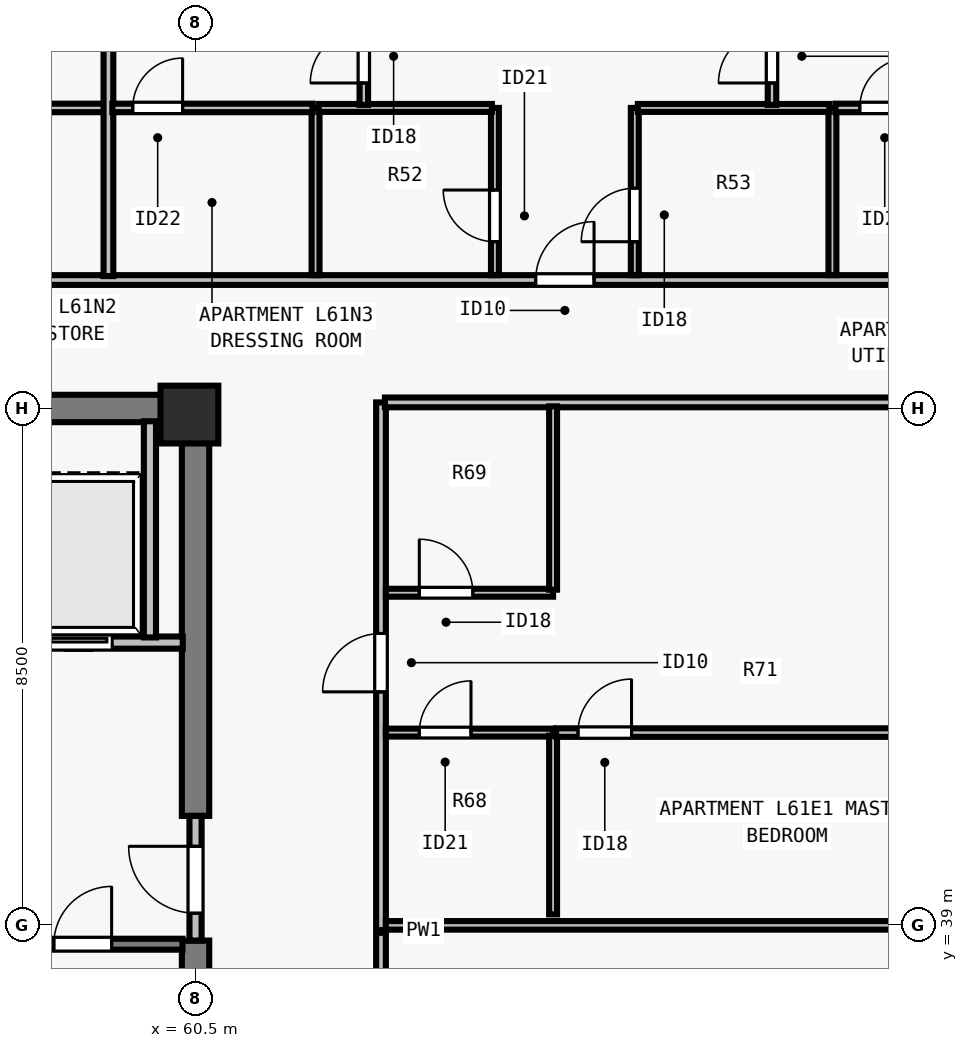
"""IFC4 building model, lengths in metres.
Left out: names, types, materials, properties, quantities, classifications, styles, units other than length and angle.
Written with IfcOpenShell. Run it as: python <this file> out.ifc"""

import sys

from ifc_helpers import new_model, si_unit, direction, frame, frame_2d, origin, origin_2d, place, context, subcontext, project, spatial, rectangle, extrude, element, fill, save


model = new_model("IFC4")
c1 = context("Model", 3, precision=1e-05, world=origin(), true_north=direction((0.0, 1.0)))
c2 = subcontext(c1, "Body", "Model", "MODEL_VIEW")
j1 = project(units=[si_unit("LENGTHUNIT", "METRE"), si_unit("PLANEANGLEUNIT", "RADIAN")], contexts=[c1])
p1 = place(None, origin())
s1 = spatial("IfcSite", under=j1, at=p1, CompositionType="ELEMENT")
p2 = place(p1, origin())
s2 = spatial("IfcBuilding", under=s1, at=p2, CompositionType="ELEMENT")
p3 = place(p2, frame((0.0, 0.0, 223.5)))
s3 = spatial("IfcBuildingStorey", under=s2, at=p3, CompositionType="ELEMENT", Elevation=223.5)
p4 = place(p3, frame((60.4, 47.4, 0.0), z_axis=(0.0, 0.0, 1.0), x_axis=(1.0, 0.0, 0.0)))
e1 = element("IfcColumn", 1, at=p4, inside=s3, PredefinedType="COLUMN", context=c2, shape_type="SweptSolid", body=[
    extrude(rectangle(XDim=0.95, YDim=0.95, at=origin_2d()), origin(), (0.0, 0.0, 1.0), 3.5),
])
p5 = place(p3, frame((43.275, 47.5, 0.0), z_axis=(0.0, 0.0, 1.0), x_axis=(1.0, 0.0, 0.0)))
e2 = element("IfcWall", 2, at=p5, inside=s3, PredefinedType="SHEAR", context=c2, shape_type="SweptSolid", body=[
    extrude(rectangle(XDim=17.45, YDim=0.45, at=frame_2d((8.725, 0.0))), origin(), (0.0, 0.0, 1.0), 3.29),
])
p6 = place(p3, frame((60.5, 30.715, 0.0), z_axis=(0.0, 0.0, 1.0), x_axis=(0.0, 1.0, 0.0)))
e3 = element("IfcWall", 3, at=p6, inside=s3, PredefinedType="SHEAR", context=c2, shape_type="SweptSolid", body=[
    extrude(rectangle(XDim=8.035, YDim=0.45, at=frame_2d((4.018, 0.0))), origin(), (0.0, 0.0, 1.0), 3.29),
])
p7 = place(p3, frame((60.5, 40.8, 0.0), z_axis=(0.0, 0.0, 1.0), x_axis=(0.0, 1.0, 0.0)))
e4 = element("IfcWall", 4, at=p7, inside=s3, PredefinedType="SHEAR", context=c2, shape_type="SweptSolid", body=[
    extrude(rectangle(XDim=6.485, YDim=0.45, at=frame_2d((3.242, 0.0))), origin(), (0.0, 0.0, 1.0), 3.29),
])
p8 = place(p3, frame((60.5, 38.75, 0.0), z_axis=(0.0, 0.0, 1.0), x_axis=(0.0, 1.0, 0.0)))
e5 = element("IfcWall", 5, at=p8, inside=s3, PredefinedType="SOLIDWALL", context=c2, shape_type="SweptSolid", body=[
    extrude(rectangle(XDim=2.05, YDim=0.2, at=frame_2d((1.025, 0.0))), origin(), (0.0, 0.0, 1.0), 3.29),
])
p9 = place(p8, frame((0.45, 0.0, 0.0)))
e6 = element("IfcOpeningElement", 6, at=p9, cuts=e5, PredefinedType="OPENING", context=c2, shape_type="SweptSolid", body=[
    extrude(rectangle(XDim=1.1, YDim=2.15, at=frame_2d((0.55, 1.075))), frame((0.0, 0.11, 0.0), z_axis=(0.0, -1.0, 0.0), x_axis=(1.0, 0.0, 0.0)), (0.0, 0.0, 1.0), 0.22),
])
p10 = place(p3, frame((56.735, 43.65, 0.0), z_axis=(0.0, 0.0, 1.0), x_axis=(1.0, 0.0, 0.0)))
e7 = element("IfcWall", 7, at=p10, inside=s3, PredefinedType="SOLIDWALL", context=c2, shape_type="SweptSolid", body=[
    extrude(rectangle(XDim=3.555, YDim=0.2, at=frame_2d((1.777, 0.0))), origin(), (0.0, 0.0, 1.0), 3.29),
])
p11 = place(p10, frame((1.295, 0.0, 0.0)))
e8 = element("IfcOpeningElement", 8, at=p11, cuts=e7, PredefinedType="OPENING", context=c2, shape_type="SweptSolid", body=[
    extrude(rectangle(XDim=1.1, YDim=2.2, at=frame_2d((0.55, 1.1))), frame((0.0, 0.11, 0.0), z_axis=(0.0, -1.0, 0.0), x_axis=(1.0, 0.0, 0.0)), (0.0, 0.0, 1.0), 0.22),
])
p12 = place(p3, frame((59.75, 43.735, 0.0), z_axis=(0.0, 0.0, 1.0), x_axis=(0.0, 1.0, 0.0)))
e9 = element("IfcWall", 9, at=p12, inside=s3, PredefinedType="SOLIDWALL", context=c2, shape_type="SweptSolid", body=[
    extrude(rectangle(XDim=3.555, YDim=0.2, at=frame_2d((1.777, 0.0))), origin(), (0.0, 0.0, 1.0), 3.29),
])
p13 = place(p3, frame((29.805, 49.613, 0.0), z_axis=(0.0, 0.0, 1.0), x_axis=(1.0, 0.0, 0.0)))
e10 = element("IfcWall", 10, at=p13, inside=s3, PredefinedType="PARTITIONING", context=c2, shape_type="SweptSolid", body=[
    extrude(rectangle(XDim=44.39, YDim=0.16, at=frame_2d((22.195, 0.0))), origin(), (0.0, 0.0, 1.0), 2.958),
])
p14 = place(p13, frame((7.206, 0.0, 0.0)))
e11 = element("IfcOpeningElement", 11, at=p14, cuts=e10, PredefinedType="OPENING", context=c2, shape_type="SweptSolid", body=[
    extrude(rectangle(XDim=0.96, YDim=2.18, at=frame_2d((0.48, 1.09))), frame((0.0, 0.09, 0.0), z_axis=(0.0, -1.0, 0.0), x_axis=(1.0, 0.0, 0.0)), (0.0, 0.0, 1.0), 0.18),
])
p15 = place(p13, frame((21.78, 0.0, 0.0)))
e12 = element("IfcOpeningElement", 12, at=p15, cuts=e10, PredefinedType="OPENING", context=c2, shape_type="SweptSolid", body=[
    extrude(rectangle(XDim=0.96, YDim=2.18, at=frame_2d((0.48, 1.09))), frame((0.0, 0.09, 0.0), z_axis=(0.0, -1.0, 0.0), x_axis=(1.0, 0.0, 0.0)), (0.0, 0.0, 1.0), 0.18),
])
p16 = place(p13, frame((36.289, 0.0, 0.0)))
e13 = element("IfcOpeningElement", 13, at=p16, cuts=e10, PredefinedType="OPENING", context=c2, shape_type="SweptSolid", body=[
    extrude(rectangle(XDim=0.96, YDim=2.18, at=frame_2d((0.48, 1.09))), frame((0.0, 0.09, 0.0), z_axis=(0.0, -1.0, 0.0), x_axis=(1.0, 0.0, 0.0)), (0.0, 0.0, 1.0), 0.18),
])
p17 = place(p3, frame((63.55, 30.4, 0.0), z_axis=(0.0, 0.0, 1.0), x_axis=(0.0, 1.0, 0.0)))
e14 = element("IfcWall", 14, at=p17, inside=s3, PredefinedType="PARTITIONING", context=c2, shape_type="SweptSolid", body=[
    extrude(rectangle(XDim=17.2, YDim=0.16, at=frame_2d((8.6, 0.0))), origin(), (0.0, 0.0, 1.0), 3.29),
])
p18 = place(p17, frame((3.6, 0.0, 0.0)))
e15 = element("IfcOpeningElement", 15, at=p18, cuts=e14, PredefinedType="OPENING", context=c2, shape_type="SweptSolid", body=[
    extrude(rectangle(XDim=0.96, YDim=2.12, at=frame_2d((0.48, 1.06))), frame((0.0, 0.09, 0.0), z_axis=(0.0, -1.0, 0.0), x_axis=(1.0, 0.0, 0.0)), (0.0, 0.0, 1.0), 0.18),
])
p19 = place(p17, frame((12.44, 0.0, 0.0)))
e16 = element("IfcOpeningElement", 16, at=p19, cuts=e14, PredefinedType="OPENING", context=c2, shape_type="SweptSolid", body=[
    extrude(rectangle(XDim=0.96, YDim=2.18, at=frame_2d((0.48, 1.09))), frame((0.0, 0.09, 0.0), z_axis=(0.0, -1.0, 0.0), x_axis=(1.0, 0.0, 0.0)), (0.0, 0.0, 1.0), 0.18),
])
p20 = place(p3, frame((63.615, 47.6, 0.0), z_axis=(0.0, 0.0, 1.0), x_axis=(1.0, 0.0, 0.0)))
e17 = element("IfcWall", 17, at=p20, inside=s3, PredefinedType="PARTITIONING", context=c2, shape_type="SweptSolid", body=[
    extrude(rectangle(XDim=10.58, YDim=0.16, at=frame_2d((5.29, 0.0))), origin(), (0.0, 0.0, 1.0), 3.29),
])
p21 = place(p3, frame((56.515, 52.442, 0.0), z_axis=(0.0, 0.0, 1.0), x_axis=(1.0, 0.0, 0.0)))
e18 = element("IfcWall", 18, at=p21, inside=s3, PredefinedType="PARTITIONING", context=c2, shape_type="SweptSolid", body=[
    extrude(rectangle(XDim=2.603, YDim=0.14, at=frame_2d((1.301, 0.0))), origin(), (0.0, 0.0, 1.0), 3.29),
])
p22 = place(p21, frame((0.4, 0.0, 0.0)))
e19 = element("IfcOpeningElement", 19, at=p22, cuts=e18, PredefinedType="OPENING", context=c2, shape_type="SweptSolid", body=[
    extrude(rectangle(XDim=0.82, YDim=2.1, at=frame_2d((0.41, 1.05))), frame((0.0, 0.08, 0.0), z_axis=(0.0, -1.0, 0.0), x_axis=(1.0, 0.0, 0.0)), (0.0, 0.0, 1.0), 0.16),
])
p23 = place(p3, frame((59.067, 49.677, 0.0), z_axis=(0.0, 0.0, 1.0), x_axis=(0.0, 1.0, 0.0)))
e20 = element("IfcWall", 20, at=p23, inside=s3, PredefinedType="PARTITIONING", context=c2, shape_type="SweptSolid", body=[
    extrude(rectangle(XDim=11.518, YDim=0.16, at=frame_2d((5.759, 0.0))), origin(), (0.0, 0.0, 1.0), 3.29),
])
p24 = place(p3, frame((62.474, 49.692, 0.0), z_axis=(0.0, 0.0, 1.0), x_axis=(0.0, 1.0, 0.0)))
e21 = element("IfcWall", 21, at=p24, inside=s3, PredefinedType="PLUMBINGWALL", context=c2, shape_type="SweptSolid", body=[
    extrude(rectangle(XDim=2.75, YDim=0.13, at=frame_2d((1.375, 0.0))), origin(), (0.0, 0.0, 1.0), 2.573),
])
p25 = place(p3, frame((65.424, 49.692, 0.0), z_axis=(0.0, 0.0, 1.0), x_axis=(0.0, 1.0, 0.0)))
e22 = element("IfcWall", 22, at=p25, inside=s3, PredefinedType="PLUMBINGWALL", context=c2, shape_type="SweptSolid", body=[
    extrude(rectangle(XDim=2.75, YDim=0.13, at=frame_2d((1.375, 0.0))), origin(), (0.0, 0.0, 1.0), 3.29),
])
p26 = place(p25, frame((0.55, 0.0, 0.0)))
e23 = element("IfcOpeningElement", 23, at=p26, cuts=e22, PredefinedType="OPENING", context=c2, shape_type="SweptSolid", body=[
    extrude(rectangle(XDim=0.85, YDim=2.08, at=frame_2d((0.425, 1.04))), frame((0.0, 0.075, 0.0), z_axis=(0.0, -1.0, 0.0), x_axis=(1.0, 0.0, 0.0)), (0.0, 0.0, 1.0), 0.15),
])
p27 = place(p3, frame((62.524, 52.442, 0.0), z_axis=(0.0, 0.0, 1.0), x_axis=(1.0, 0.0, 0.0)))
e24 = element("IfcWall", 24, at=p27, inside=s3, PredefinedType="PLUMBINGWALL", context=c2, shape_type="SweptSolid", body=[
    extrude(rectangle(XDim=2.85, YDim=0.13, at=frame_2d((1.425, 0.0))), origin(), (0.0, 0.0, 1.0), 3.29),
])
p28 = place(p3, frame((70.974, 49.692, 0.0), z_axis=(0.0, 0.0, 1.0), x_axis=(0.0, 1.0, 0.0)))
e25 = element("IfcWall", 25, at=p28, inside=s3, PredefinedType="PLUMBINGWALL", context=c2, shape_type="SweptSolid", body=[
    extrude(rectangle(XDim=2.75, YDim=0.13, at=frame_2d((1.375, 0.0))), origin(), (0.0, 0.0, 1.0), 3.29),
])
p29 = place(p3, frame((67.724, 49.692, 0.0), z_axis=(0.0, 0.0, 1.0), x_axis=(0.0, 1.0, 0.0)))
e26 = element("IfcWall", 26, at=p29, inside=s3, PredefinedType="PLUMBINGWALL", context=c2, shape_type="SweptSolid", body=[
    extrude(rectangle(XDim=2.75, YDim=0.13, at=frame_2d((1.375, 0.0))), origin(), (0.0, 0.0, 1.0), 3.29),
])
p30 = place(p29, frame((0.55, 0.0, 0.0)))
e27 = element("IfcOpeningElement", 27, at=p30, cuts=e26, PredefinedType="OPENING", context=c2, shape_type="SweptSolid", body=[
    extrude(rectangle(XDim=0.88, YDim=2.1, at=frame_2d((0.44, 1.05))), frame((0.0, 0.075, 0.0), z_axis=(0.0, -1.0, 0.0), x_axis=(1.0, 0.0, 0.0)), (0.0, 0.0, 1.0), 0.15),
])
p31 = place(p3, frame((67.774, 52.442, 0.0), z_axis=(0.0, 0.0, 1.0), x_axis=(1.0, 0.0, 0.0)))
e28 = element("IfcWall", 28, at=p31, inside=s3, PredefinedType="PLUMBINGWALL", context=c2, shape_type="SweptSolid", body=[
    extrude(rectangle(XDim=3.15, YDim=0.13, at=frame_2d((1.575, 0.0))), origin(), (0.0, 0.0, 1.0), 2.958),
])
p32 = place(p3, frame((63.268, 52.492, 0.0), z_axis=(0.0, 0.0, 1.0), x_axis=(0.0, 1.0, 0.0)))
e29 = element("IfcWall", 29, at=p32, inside=s3, PredefinedType="PARTITIONING", context=c2, shape_type="SweptSolid", body=[
    extrude(rectangle(XDim=8.628, YDim=0.14, at=frame_2d((4.314, 0.0))), origin(), (0.0, 0.0, 1.0), 3.29),
])
p33 = place(p32, frame((0.36, 0.0, 0.0)))
e30 = element("IfcOpeningElement", 30, at=p33, cuts=e29, PredefinedType="OPENING", context=c2, shape_type="SweptSolid", body=[
    extrude(rectangle(XDim=0.88, YDim=2.1, at=frame_2d((0.44, 1.05))), frame((0.0, 0.08, 0.0), z_axis=(0.0, -1.0, 0.0), x_axis=(1.0, 0.0, 0.0)), (0.0, 0.0, 1.0), 0.16),
])
p34 = place(p3, frame((59.133, 52.442, 0.0), z_axis=(0.0, 0.0, 1.0), x_axis=(1.0, 0.0, 0.0)))
e31 = element("IfcWall", 31, at=p34, inside=s3, PredefinedType="PARTITIONING", context=c2, shape_type="SweptSolid", body=[
    extrude(rectangle(XDim=3.291, YDim=0.14, at=frame_2d((1.646, 0.0))), origin(), (0.0, 0.0, 1.0), 3.29),
])
p35 = place(p34, frame((0.335, 0.0, 0.0)))
e32 = element("IfcOpeningElement", 32, at=p35, cuts=e31, PredefinedType="OPENING", context=c2, shape_type="SweptSolid", body=[
    extrude(rectangle(XDim=0.82, YDim=2.1, at=frame_2d((0.41, 1.05))), frame((0.0, 0.08, 0.0), z_axis=(0.0, -1.0, 0.0), x_axis=(1.0, 0.0, 0.0)), (0.0, 0.0, 1.0), 0.16),
])
p36 = place(p3, frame((69.98, 52.492, 0.0), z_axis=(0.0, 0.0, 1.0), x_axis=(0.0, 1.0, 0.0)))
e33 = element("IfcWall", 33, at=p36, inside=s3, PredefinedType="PARTITIONING", context=c2, shape_type="SweptSolid", body=[
    extrude(rectangle(XDim=3.703, YDim=0.14, at=frame_2d((1.851, 0.0))), origin(), (0.0, 0.0, 1.0), 3.29),
])
p37 = place(p36, frame((0.36, 0.0, 0.0)))
e34 = element("IfcOpeningElement", 34, at=p37, cuts=e33, PredefinedType="OPENING", context=c2, shape_type="SweptSolid", body=[
    extrude(rectangle(XDim=0.88, YDim=2.1, at=frame_2d((0.44, 1.05))), frame((0.0, 0.08, 0.0), z_axis=(0.0, -1.0, 0.0), x_axis=(1.0, 0.0, 0.0)), (0.0, 0.0, 1.0), 0.16),
])
p38 = place(p3, frame((71.024, 52.442, 0.0), z_axis=(0.0, 0.0, 1.0), x_axis=(1.0, 0.0, 0.0)))
e35 = element("IfcWall", 35, at=p38, inside=s3, PredefinedType="PARTITIONING", context=c2, shape_type="SweptSolid", body=[
    extrude(rectangle(XDim=3.106, YDim=0.14, at=frame_2d((1.553, 0.0))), origin(), (0.0, 0.0, 1.0), 3.29),
])
p39 = place(p38, frame((0.4, 0.0, 0.0)))
e36 = element("IfcOpeningElement", 36, at=p39, cuts=e35, PredefinedType="OPENING", context=c2, shape_type="SweptSolid", body=[
    extrude(rectangle(XDim=0.82, YDim=2.1, at=frame_2d((0.41, 1.05))), frame((0.0, 0.08, 0.0), z_axis=(0.0, -1.0, 0.0), x_axis=(1.0, 0.0, 0.0)), (0.0, 0.0, 1.0), 0.16),
])
p40 = place(p3, frame((63.63, 39.0, 0.0), z_axis=(0.0, 0.0, 1.0), x_axis=(1.0, 0.0, 0.0)))
e37 = element("IfcWall", 37, at=p40, inside=s3, PredefinedType="PARTITIONING", context=c2, shape_type="SweptSolid", body=[
    extrude(rectangle(XDim=10.565, YDim=0.14, at=frame_2d((5.283, 0.0))), origin(), (0.0, 0.0, 1.0), 3.29),
])
p41 = place(p3, frame((63.63, 42.17, 0.0), z_axis=(0.0, 0.0, 1.0), x_axis=(1.0, 0.0, 0.0)))
e38 = element("IfcWall", 38, at=p41, inside=s3, PredefinedType="PLUMBINGWALL", context=c2, shape_type="SweptSolid", body=[
    extrude(rectangle(XDim=2.75, YDim=0.13, at=frame_2d((1.375, 0.0))), origin(), (0.0, 0.0, 1.0), 3.29),
])
p42 = place(p41, frame((0.55, 0.0, 0.0)))
e39 = element("IfcOpeningElement", 39, at=p42, cuts=e38, PredefinedType="OPENING", context=c2, shape_type="SweptSolid", body=[
    extrude(rectangle(XDim=0.85, YDim=2.08, at=frame_2d((0.425, 1.04))), frame((0.0, 0.075, 0.0), z_axis=(0.0, -1.0, 0.0), x_axis=(1.0, 0.0, 0.0)), (0.0, 0.0, 1.0), 0.15),
])
p43 = place(p3, frame((66.38, 39.18, 0.0), z_axis=(0.0, 0.0, 1.0), x_axis=(0.0, 1.0, 0.0)))
e40 = element("IfcWall", 40, at=p43, inside=s3, PredefinedType="PLUMBINGWALL", context=c2, shape_type="SweptSolid", body=[
    extrude(rectangle(XDim=2.94, YDim=0.13, at=frame_2d((1.47, 0.0))), origin(), (0.0, 0.0, 1.0), 3.29),
])
p44 = place(p3, frame((63.63, 44.47, 0.0), z_axis=(0.0, 0.0, 1.0), x_axis=(1.0, 0.0, 0.0)))
e41 = element("IfcWall", 41, at=p44, inside=s3, PredefinedType="PLUMBINGWALL", context=c2, shape_type="SweptSolid", body=[
    extrude(rectangle(XDim=2.75, YDim=0.13, at=frame_2d((1.375, 0.0))), origin(), (0.0, 0.0, 1.0), 3.29),
])
p45 = place(p44, frame((0.55, 0.0, 0.0)))
e42 = element("IfcOpeningElement", 42, at=p45, cuts=e41, PredefinedType="OPENING", context=c2, shape_type="SweptSolid", body=[
    extrude(rectangle(XDim=0.88, YDim=2.1, at=frame_2d((0.44, 1.05))), frame((0.0, 0.075, 0.0), z_axis=(0.0, -1.0, 0.0), x_axis=(1.0, 0.0, 0.0)), (0.0, 0.0, 1.0), 0.15),
])
p46 = place(p3, frame((66.38, 44.52, 0.0), z_axis=(0.0, 0.0, 1.0), x_axis=(0.0, 1.0, 0.0)))
e43 = element("IfcWall", 43, at=p46, inside=s3, PredefinedType="PLUMBINGWALL", context=c2, shape_type="SweptSolid", body=[
    extrude(rectangle(XDim=3.015, YDim=0.13, at=frame_2d((1.507, 0.0))), origin(), (0.0, 0.0, 1.0), 3.29),
])
p47 = place(p3, frame((66.43, 42.17, 0.0), z_axis=(0.0, 0.0, 1.0), x_axis=(1.0, 0.0, 0.0)))
e44 = element("IfcWall", 44, at=p47, inside=s3, PredefinedType="PARTITIONING", context=c2, shape_type="SweptSolid", body=[
    extrude(rectangle(XDim=7.69, YDim=0.14, at=frame_2d((3.845, 0.0))), origin(), (0.0, 0.0, 1.0), 3.29),
])
p48 = place(p47, frame((0.36, 0.0, 0.0)))
e45 = element("IfcOpeningElement", 45, at=p48, cuts=e44, PredefinedType="OPENING", context=c2, shape_type="SweptSolid", body=[
    extrude(rectangle(XDim=0.88, YDim=2.1, at=frame_2d((0.44, 1.05))), frame((0.0, 0.08, 0.0), z_axis=(0.0, -1.0, 0.0), x_axis=(1.0, 0.0, 0.0)), (0.0, 0.0, 1.0), 0.16),
])
p49 = place(p3, frame((57.005, 38.69, 0.0), z_axis=(0.0, 0.0, 1.0), x_axis=(1.0, 0.0, 0.0)))
e46 = element("IfcWall", 46, at=p49, inside=s3, PredefinedType="SOLIDWALL", context=c2, shape_type="SweptSolid", body=[
    extrude(rectangle(XDim=3.28, YDim=0.18, at=frame_2d((1.64, 0.0))), origin(), (0.0, 0.0, 1.0), 3.29),
])
p50 = place(p49, frame((1.165, 0.0, 0.0)))
e47 = element("IfcOpeningElement", 47, at=p50, cuts=e46, PredefinedType="OPENING", context=c2, shape_type="SweptSolid", body=[
    extrude(rectangle(XDim=0.95, YDim=2.15, at=frame_2d((0.475, 1.075))), frame((0.0, 0.1, 0.0), z_axis=(0.0, -1.0, 0.0), x_axis=(1.0, 0.0, 0.0)), (0.0, 0.0, 1.0), 0.2),
])
p51 = place(p9, origin())
e48 = element("IfcDoor", 48, at=p51, inside=s3, OperationType="SINGLE_SWING_RIGHT", PredefinedType="DOOR", context=c2, shape_type="SweptSolid", body=[
    extrude(rectangle(XDim=1.1, YDim=2.15, at=frame_2d((0.55, 1.075))), frame((0.0, 0.025, 0.0), z_axis=(0.0, -1.0, 0.0), x_axis=(1.0, 0.0, 0.0)), (0.0, 0.0, 1.0), 0.05),
])
fill(e6, e48)
p52 = place(p11, origin())
e49 = element("IfcDoor", 49, at=p52, inside=s3, OperationType="SLIDING_TO_LEFT", PredefinedType="DOOR", context=c2, shape_type="SweptSolid", body=[
    extrude(rectangle(XDim=1.1, YDim=2.2, at=frame_2d((0.55, 1.1))), frame((0.0, 0.025, 0.0), z_axis=(0.0, -1.0, 0.0), x_axis=(1.0, 0.0, 0.0)), (0.0, 0.0, 1.0), 0.05),
])
fill(e8, e49)
p53 = place(p26, origin())
e50 = element("IfcDoor", 50, at=p53, inside=s3, OperationType="SINGLE_SWING_RIGHT", PredefinedType="DOOR", context=c2, shape_type="SweptSolid", body=[
    extrude(rectangle(XDim=0.85, YDim=2.08, at=frame_2d((0.425, 1.04))), frame((0.0, 0.025, 0.0), z_axis=(0.0, -1.0, 0.0), x_axis=(1.0, 0.0, 0.0)), (0.0, 0.0, 1.0), 0.05),
])
fill(e23, e50)
p54 = place(p30, origin())
e51 = element("IfcDoor", 51, at=p54, inside=s3, OperationType="SINGLE_SWING_LEFT", PredefinedType="DOOR", context=c2, shape_type="SweptSolid", body=[
    extrude(rectangle(XDim=0.88, YDim=2.1, at=frame_2d((0.44, 1.05))), frame((0.0, 0.025, 0.0), z_axis=(0.0, -1.0, 0.0), x_axis=(1.0, 0.0, 0.0)), (0.0, 0.0, 1.0), 0.05),
])
fill(e27, e51)
p55 = place(p35, origin())
e52 = element("IfcDoor", 52, at=p55, inside=s3, OperationType="SINGLE_SWING_RIGHT", PredefinedType="DOOR", context=c2, shape_type="SweptSolid", body=[
    extrude(rectangle(XDim=0.82, YDim=2.1, at=frame_2d((0.41, 1.05))), frame((0.0, 0.025, 0.0), z_axis=(0.0, -1.0, 0.0), x_axis=(1.0, 0.0, 0.0)), (0.0, 0.0, 1.0), 0.05),
])
fill(e32, e52)
p56 = place(p33, origin())
e53 = element("IfcDoor", 53, at=p56, inside=s3, OperationType="SINGLE_SWING_LEFT", PredefinedType="DOOR", context=c2, shape_type="SweptSolid", body=[
    extrude(rectangle(XDim=0.88, YDim=2.1, at=frame_2d((0.44, 1.05))), frame((0.0, 0.025, 0.0), z_axis=(0.0, -1.0, 0.0), x_axis=(1.0, 0.0, 0.0)), (0.0, 0.0, 1.0), 0.05),
])
fill(e30, e53)
p57 = place(p39, origin())
e54 = element("IfcDoor", 54, at=p57, inside=s3, OperationType="SINGLE_SWING_RIGHT", PredefinedType="DOOR", context=c2, shape_type="SweptSolid", body=[
    extrude(rectangle(XDim=0.82, YDim=2.1, at=frame_2d((0.41, 1.05))), frame((0.0, 0.025, 0.0), z_axis=(0.0, -1.0, 0.0), x_axis=(1.0, 0.0, 0.0)), (0.0, 0.0, 1.0), 0.05),
])
fill(e36, e54)
p58 = place(p37, origin())
e55 = element("IfcDoor", 55, at=p58, inside=s3, OperationType="SINGLE_SWING_LEFT", PredefinedType="DOOR", context=c2, shape_type="SweptSolid", body=[
    extrude(rectangle(XDim=0.88, YDim=2.1, at=frame_2d((0.44, 1.05))), frame((0.0, 0.025, 0.0), z_axis=(0.0, -1.0, 0.0), x_axis=(1.0, 0.0, 0.0)), (0.0, 0.0, 1.0), 0.05),
])
fill(e34, e55)
p59 = place(p16, origin())
e56 = element("IfcDoor", 56, at=p59, inside=s3, OperationType="SINGLE_SWING_RIGHT", PredefinedType="DOOR", context=c2, shape_type="SweptSolid", body=[
    extrude(rectangle(XDim=0.96, YDim=2.18, at=frame_2d((0.48, 1.09))), frame((0.0, 0.025, 0.0), z_axis=(0.0, -1.0, 0.0), x_axis=(1.0, 0.0, 0.0)), (0.0, 0.0, 1.0), 0.05),
])
fill(e13, e56)
p60 = place(p42, origin())
e57 = element("IfcDoor", 57, at=p60, inside=s3, OperationType="SINGLE_SWING_RIGHT", PredefinedType="DOOR", context=c2, shape_type="SweptSolid", body=[
    extrude(rectangle(XDim=0.85, YDim=2.08, at=frame_2d((0.425, 1.04))), frame((0.0, 0.025, 0.0), z_axis=(0.0, -1.0, 0.0), x_axis=(1.0, 0.0, 0.0)), (0.0, 0.0, 1.0), 0.05),
])
fill(e39, e57)
p61 = place(p45, origin())
e58 = element("IfcDoor", 58, at=p61, inside=s3, OperationType="SINGLE_SWING_LEFT", PredefinedType="DOOR", context=c2, shape_type="SweptSolid", body=[
    extrude(rectangle(XDim=0.88, YDim=2.1, at=frame_2d((0.44, 1.05))), frame((0.0, 0.025, 0.0), z_axis=(0.0, -1.0, 0.0), x_axis=(1.0, 0.0, 0.0)), (0.0, 0.0, 1.0), 0.05),
])
fill(e42, e58)
p62 = place(p48, origin())
e59 = element("IfcDoor", 59, at=p62, inside=s3, OperationType="SINGLE_SWING_RIGHT", PredefinedType="DOOR", context=c2, shape_type="SweptSolid", body=[
    extrude(rectangle(XDim=0.88, YDim=2.1, at=frame_2d((0.44, 1.05))), frame((0.0, 0.025, 0.0), z_axis=(0.0, -1.0, 0.0), x_axis=(1.0, 0.0, 0.0)), (0.0, 0.0, 1.0), 0.05),
])
fill(e45, e59)
p63 = place(p19, origin())
e60 = element("IfcDoor", 60, at=p63, inside=s3, OperationType="SINGLE_SWING_LEFT", PredefinedType="DOOR", context=c2, shape_type="SweptSolid", body=[
    extrude(rectangle(XDim=0.96, YDim=2.18, at=frame_2d((0.48, 1.09))), frame((0.0, 0.025, 0.0), z_axis=(0.0, -1.0, 0.0), x_axis=(1.0, 0.0, 0.0)), (0.0, 0.0, 1.0), 0.05),
])
fill(e16, e60)
p64 = place(p50, origin())
e61 = element("IfcDoor", 61, at=p64, inside=s3, OperationType="SINGLE_SWING_RIGHT", PredefinedType="DOOR", context=c2, shape_type="SweptSolid", body=[
    extrude(rectangle(XDim=0.95, YDim=2.15, at=frame_2d((0.475, 1.075))), frame((0.0, 0.025, 0.0), z_axis=(0.0, -1.0, 0.0), x_axis=(1.0, 0.0, 0.0)), (0.0, 0.0, 1.0), 0.05),
])
fill(e47, e61)
save(model, sys.argv[1])
